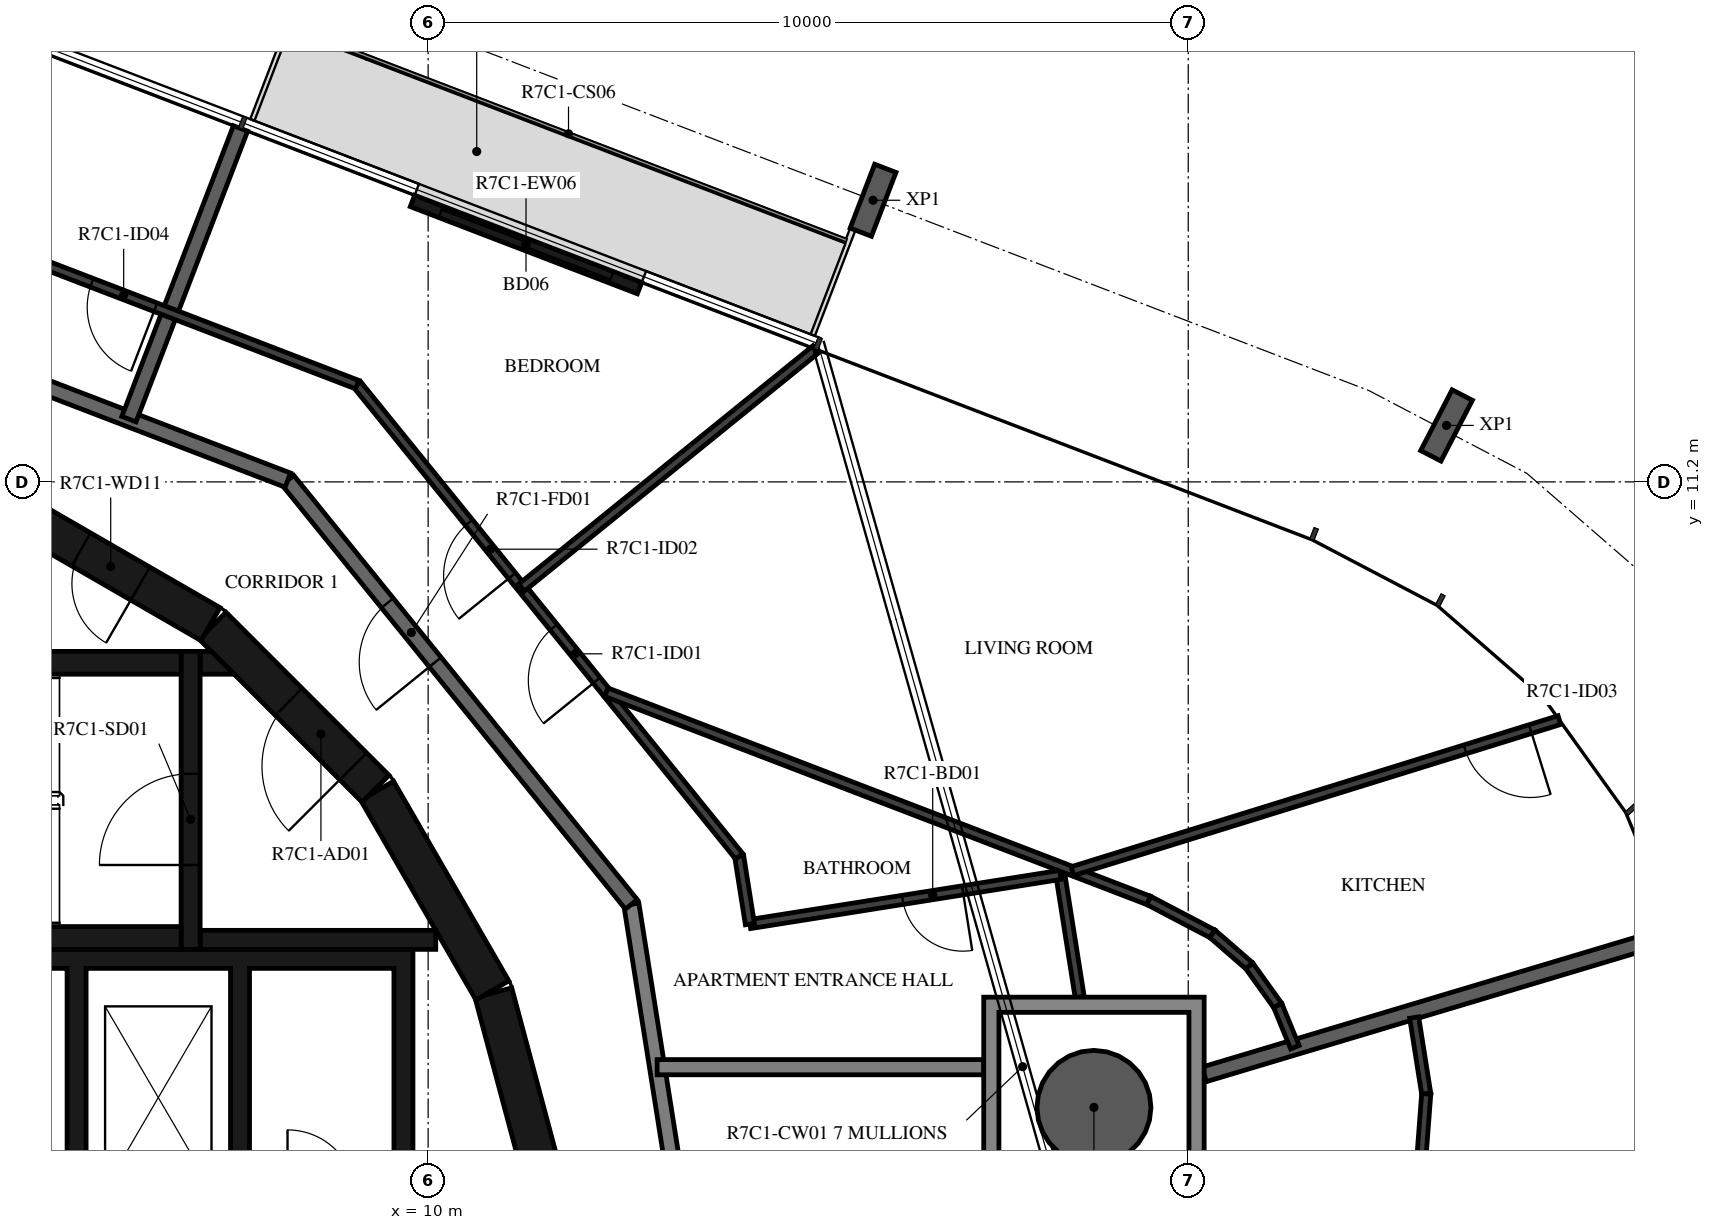
"""IFC4 building model, lengths in metres.
Left out: names, types, materials, properties, quantities, classifications, styles, units other than length and angle.
Written with IfcOpenShell. Run it as: python <this file> out.ifc"""

import sys

from ifc_helpers import new_model, si_unit, direction, frame, frame_2d, origin, origin_2d, place, context, subcontext, project, spatial, polyline, rectangle, hollow_circle, i_section, outline, extrude, element, fill, save


model = new_model("IFC4")
c1 = context("Model", 3, precision=1e-05, world=origin(), true_north=direction((0.0, 1.0)))
c2 = subcontext(c1, "Body", "Model", "MODEL_VIEW")
j1 = project(units=[si_unit("LENGTHUNIT", "METRE"), si_unit("PLANEANGLEUNIT", "RADIAN")], contexts=[c1])
p1 = place(None, origin())
s1 = spatial("IfcSite", under=j1, at=p1, CompositionType="ELEMENT")
p2 = place(p1, origin())
s2 = spatial("IfcBuilding", under=s1, at=p2, CompositionType="ELEMENT")
p3 = place(p2, frame((0.0, 0.0, 287.9)))
s3 = spatial("IfcBuildingStorey", under=s2, at=p3, CompositionType="ELEMENT", Elevation=287.9)
p4 = place(p3, frame((18.76, 2.971, -0.38), z_axis=(0.0, 0.0, 1.0), x_axis=(1.0, 0.0, 0.0)))
e1 = element("IfcColumn", 1, at=p4, inside=s3, PredefinedType="COLUMN", context=c2, shape_type="SweptSolid", body=[
    extrude(hollow_circle(Radius=0.75, WallThickness=0.035, at=origin_2d()), origin(), (0.0, 0.0, 1.0), 2.616),
])
for number, where, z_axis, x_axis in (
    (2, (23.398, 11.943, -0.38), (0.0, 0.0, 1.0), (0.888, -0.459, 0.0)),
    (3, (15.854, 14.905, -0.38), (0.0, 0.0, 1.0), (0.934, -0.358, 0.0)),
):
    element("IfcColumn", number, at=place(p3, frame(where, z_axis=z_axis, x_axis=x_axis)), inside=s3, PredefinedType="COLUMN", context=c2, shape_type="SweptSolid", body=[
        extrude(i_section(OverallWidth=0.3, OverallDepth=0.9, WebThickness=0.019, FlangeThickness=0.035, FilletRadius=0.03, at=origin_2d()), origin(), (0.0, 0.0, 1.0), 2.616),
    ])
p5 = place(p3, frame((12.781, 13.75, 0.0), z_axis=(0.0, 0.0, 1.0), x_axis=(-0.933579413923, 0.358370587381, 0.0)))
e4 = element("IfcWall", 4, at=p5, inside=s3, PredefinedType="STANDARD", context=c2, shape_type="SweptSolid", body=[
    extrude(rectangle(XDim=3.2, YDim=0.16, at=frame_2d((1.6, 0.0))), origin(), (0.0, 0.0, 1.0), 3.05),
])
p6 = place(p5, frame((0.4, 0.0, 0.0)))
e5 = element("IfcOpeningElement", 5, at=p6, cuts=e4, PredefinedType="OPENING", context=c2, shape_type="SweptSolid", body=[
    extrude(rectangle(XDim=2.4, YDim=2.4, at=frame_2d((1.2, 1.2))), frame((0.0, 0.09, 0.0), z_axis=(0.0, -1.0, 0.0), x_axis=(1.0, 0.0, 0.0)), (0.0, 0.0, 1.0), 0.18),
])
for number, where, z_axis, x_axis in (
    (6, (11.643, 1.55, 0.0), (0.0, 0.0, 1.0), (-0.259, 0.966, 0.0)),
    (7, (10.845, 4.51, 0.0), (0.0, 0.0, 1.0), (-0.5, 0.866, 0.0)),
):
    element("IfcWall", number, at=place(p3, frame(where, z_axis=z_axis, x_axis=x_axis)), inside=s3, PredefinedType="SHEAR", context=c2, shape_type="SweptSolid", body=[
        extrude(rectangle(XDim=3.033, YDim=0.5, at=frame_2d((1.516, 0.0))), origin(), (0.0, 0.0, 1.0), 3.05),
    ])
p7 = place(p3, frame((9.308, 7.164, 0.0), z_axis=(0.0, 0.0, 1.0), x_axis=(-0.707106781187, 0.707106781187, 0.0)))
e8 = element("IfcWall", 8, at=p7, inside=s3, PredefinedType="SHEAR", context=c2, shape_type="SweptSolid", body=[
    extrude(rectangle(XDim=3.032, YDim=0.5, at=frame_2d((1.516, 0.0))), origin(), (0.0, 0.0, 1.0), 3.05),
])
p8 = place(p7, frame((0.416, 0.0, 0.0)))
e9 = element("IfcOpeningElement", 9, at=p8, cuts=e8, PredefinedType="OPENING", context=c2, shape_type="SweptSolid", body=[
    extrude(rectangle(XDim=1.2, YDim=2.1, at=frame_2d((0.6, 1.05))), frame((0.0, 0.26, 0.0), z_axis=(0.0, -1.0, 0.0), x_axis=(1.0, 0.0, 0.0)), (0.0, 0.0, 1.0), 0.52),
])
p9 = place(p3, frame((7.137, 9.329, 0.0), z_axis=(0.0, 0.0, 1.0), x_axis=(-0.865975092491, 0.500087131594, 0.0)))
e10 = element("IfcWall", 10, at=p9, inside=s3, PredefinedType="SHEAR", context=c2, shape_type="SweptSolid", body=[
    extrude(rectangle(XDim=3.033, YDim=0.5, at=frame_2d((1.516, 0.0))), origin(), (0.0, 0.0, 1.0), 3.05),
])
p10 = place(p9, frame((1.066, 0.0, 0.0)))
e11 = element("IfcOpeningElement", 11, at=p10, cuts=e10, PredefinedType="OPENING", context=c2, shape_type="SweptSolid", body=[
    extrude(rectangle(XDim=0.9, YDim=2.1, at=frame_2d((0.45, 1.05))), frame((0.0, 0.26, 0.0), z_axis=(0.0, -1.0, 0.0), x_axis=(1.0, 0.0, 0.0)), (0.0, 0.0, 1.0), 0.52),
])
for number, where, z_axis, x_axis in (
    (12, (0.0, 5.2, 0.0), (0.0, 0.0, 1.0), (1.0, 0.0, 0.0)),
    (13, (0.0, 8.82, 0.0), (0.0, 0.0, 1.0), (1.0, 0.0, 0.0)),
):
    element("IfcWall", number, at=place(p3, frame(where, z_axis=z_axis, x_axis=x_axis)), inside=s3, PredefinedType="SHEAR", context=c2, shape_type="SweptSolid", body=[
        extrude(rectangle(XDim=6.75, YDim=0.3, at=frame_2d((3.375, 0.0))), origin(), (0.0, 0.0, 1.0), 3.05),
    ])
p11 = place(p3, frame((6.875, 5.05, 0.0), z_axis=(0.0, 0.0, 1.0), x_axis=(0.0, 1.0, 0.0)))
e14 = element("IfcWall", 14, at=p11, inside=s3, PredefinedType="SHEAR", context=c2, shape_type="SweptSolid", body=[
    extrude(rectangle(XDim=3.92, YDim=0.25, at=frame_2d((1.96, 0.0))), origin(), (0.0, 0.0, 1.0), 3.05),
])
p12 = place(p11, frame((1.11, 0.0, 0.0)))
e15 = element("IfcOpeningElement", 15, at=p12, cuts=e14, PredefinedType="OPENING", context=c2, shape_type="SweptSolid", body=[
    extrude(rectangle(XDim=1.2, YDim=2.1, at=frame_2d((0.6, 1.05))), frame((0.0, 0.135, 0.0), z_axis=(0.0, -1.0, 0.0), x_axis=(1.0, 0.0, 0.0)), (0.0, 0.0, 1.0), 0.27),
])
p13 = place(p3, frame((7.0, 5.175, 0.0), z_axis=(0.0, 0.0, 1.0), x_axis=(1.0, 0.0, 0.0)))
e16 = element("IfcWall", 16, at=p13, inside=s3, PredefinedType="SHEAR", context=c2, shape_type="SweptSolid", body=[
    extrude(rectangle(XDim=3.1, YDim=0.25, at=frame_2d((1.55, 0.0))), origin(), (0.0, 0.0, 1.0), 3.05),
])
p14 = place(p3, origin())
e17 = element("IfcWall", 17, at=p14, inside=s3, PredefinedType="SHEAR", context=c2, shape_type="SweptSolid", body=[
    extrude(outline(polyline([(7.448, 8.67), (7.0, 8.67), (7.0, 8.97), (7.148, 8.97), (7.448, 8.67)])), origin(), (0.0, 0.0, 1.0), 3.05),
])
p15 = place(p3, origin())
e18 = element("IfcWall", 18, at=p15, inside=s3, PredefinedType="SHEAR", context=c2, shape_type="SweptSolid", body=[
    extrude(outline(polyline([(-9.8, 1.9), (-9.55, 1.9), (-9.55, 4.8), (-5.5, 4.8), (-5.5, 1.9), (-5.25, 1.9), (-5.25, 4.8), (3.1, 4.8), (3.1, 1.9), (3.35, 1.9), (3.35, 4.8), (5.25, 4.8), (5.25, 1.9), (5.5, 1.9), (5.5, 4.8), (7.4, 4.8), (7.4, 1.9), (7.65, 1.9), (7.65, 4.8), (9.55, 4.8), (9.55, 1.9), (9.8, 1.9), (9.8, 4.8), (9.8, 5.05), (-9.8, 5.05), (-9.8, 4.8), (-9.8, 1.9)])), origin(), (0.0, 0.0, 1.0), 3.05),
])
p16 = place(p3, frame((13.797, -1.45, 0.0), z_axis=(0.0, 0.0, 1.0), x_axis=(-0.156421704315, 0.987690361611, 0.0)))
e19 = element("IfcWall", 19, at=p16, inside=s3, PredefinedType="STANDARD", context=c2, shape_type="SweptSolid", body=[
    extrude(rectangle(XDim=7.181, YDim=0.2, at=frame_2d((3.591, 0.0))), origin(), (0.0, 0.0, 1.0), 3.05),
])
p17 = place(p3, frame((12.673, 5.643, 0.0), z_axis=(0.0, 0.0, 1.0), x_axis=(-0.629302871585, 0.777160148113, 0.0)))
e20 = element("IfcWall", 20, at=p17, inside=s3, PredefinedType="STANDARD", context=c2, shape_type="SweptSolid", body=[
    extrude(rectangle(XDim=7.181, YDim=0.2, at=frame_2d((3.59, 0.0))), origin(), (0.0, 0.0, 1.0), 3.05),
])
p18 = place(p17, frame((4.1, 0.0, 0.0)))
e21 = element("IfcOpeningElement", 21, at=p18, cuts=e20, PredefinedType="OPENING", context=c2, shape_type="SweptSolid", body=[
    extrude(rectangle(XDim=1.0, YDim=2.1, at=frame_2d((0.5, 1.05))), frame((0.0, 0.11, 0.0), z_axis=(0.0, -1.0, 0.0), x_axis=(1.0, 0.0, 0.0)), (0.0, 0.0, 1.0), 0.22),
])
p19 = place(p3, frame((8.154, 11.223, 0.0), z_axis=(0.0, 0.0, 1.0), x_axis=(-0.93359073609, 0.358341090983, 0.0)))
e22 = element("IfcWall", 22, at=p19, inside=s3, PredefinedType="STANDARD", context=c2, shape_type="SweptSolid", body=[
    extrude(rectangle(XDim=7.181, YDim=0.2, at=frame_2d((3.59, 0.0))), origin(), (0.0, 0.0, 1.0), 3.05),
])
p20 = place(p3, frame((17.309, 3.5, 0.0), z_axis=(0.0, 0.0, 1.0), x_axis=(-1.0, 0.0, 0.0)))
e23 = element("IfcWall", 23, at=p20, inside=s3, PredefinedType="STANDARD", context=c2, shape_type="SweptSolid", body=[
    extrude(rectangle(XDim=4.297, YDim=0.2, at=frame_2d((2.148, 0.0))), origin(), (0.0, 0.0, 1.0), 3.05),
])
p21 = place(p3, frame((7.532, 15.85, 0.0), z_axis=(0.0, 0.0, 1.0), x_axis=(-0.358355996975, -0.933585014571, 0.0)))
e24 = element("IfcWall", 24, at=p21, inside=s3, PredefinedType="STANDARD", context=c2, shape_type="SweptSolid", body=[
    extrude(rectangle(XDim=4.096, YDim=0.2, at=frame_2d((2.048, 0.0))), origin(), (0.0, 0.0, 1.0), 3.05),
])
p22 = place(p3, frame((20.209, 3.405, 0.0), z_axis=(0.0, 0.0, 1.0), x_axis=(0.957991224208, 0.286797514529, 0.0)))
e25 = element("IfcWall", 25, at=p22, inside=s3, PredefinedType="STANDARD", context=c2, shape_type="SweptSolid", body=[
    extrude(rectangle(XDim=6.471, YDim=0.2, at=frame_2d((3.236, 0.0))), origin(), (0.0, 0.0, 1.0), 3.05),
])
p23 = place(p3, frame((18.572, 4.421, 0.0), z_axis=(0.0, 0.0, 1.0), x_axis=(-0.156347444306, 0.987702119396, 0.0)))
e26 = element("IfcWall", 26, at=p23, inside=s3, PredefinedType="PARTITIONING", context=c2, shape_type="SweptSolid", body=[
    extrude(rectangle(XDim=1.629, YDim=0.12, at=frame_2d((0.814, 0.0))), origin(), (0.0, 0.0, 1.0), 3.05),
])
p24 = place(p3, frame((18.317, 6.03, 0.0), z_axis=(0.0, 0.0, 1.0), x_axis=(-0.9876848128, -0.156456737039, 0.0)))
e27 = element("IfcWall", 27, at=p24, inside=s3, PredefinedType="PARTITIONING", context=c2, shape_type="SweptSolid", body=[
    extrude(rectangle(XDim=4.135, YDim=0.12, at=frame_2d((2.068, 0.0))), origin(), (0.0, 0.0, 1.0), 3.05),
])
p25 = place(p24, frame((1.3, 0.0, 0.0)))
e28 = element("IfcOpeningElement", 28, at=p25, cuts=e27, PredefinedType="OPENING", context=c2, shape_type="SweptSolid", body=[
    extrude(rectangle(XDim=0.8, YDim=2.1, at=frame_2d((0.4, 1.05))), frame((0.0, 0.07, 0.0), z_axis=(0.0, -1.0, 0.0), x_axis=(1.0, 0.0, 0.0)), (0.0, 0.0, 1.0), 0.14),
])
p26 = place(p3, frame((14.233, 5.383, 0.0), z_axis=(0.0, 0.0, 1.0), x_axis=(-0.156365428504, 0.987699272435, 0.0)))
e29 = element("IfcWall", 29, at=p26, inside=s3, PredefinedType="PARTITIONING", context=c2, shape_type="SweptSolid", body=[
    extrude(rectangle(XDim=0.902, YDim=0.12, at=frame_2d((0.451, 0.0))), origin(), (0.0, 0.0, 1.0), 3.05),
])
p27 = place(p3, frame((14.092, 6.274, 0.0), z_axis=(0.0, 0.0, 1.0), x_axis=(-0.62933367237, 0.777135206268, 0.0)))
e30 = element("IfcWall", 30, at=p27, inside=s3, PredefinedType="PARTITIONING", context=c2, shape_type="SweptSolid", body=[
    extrude(rectangle(XDim=7.985, YDim=0.12, at=frame_2d((3.992, 0.0))), origin(), (0.0, 0.0, 1.0), 3.05),
])
p28 = place(p27, frame((2.978, 0.0, 0.0)))
e31 = element("IfcOpeningElement", 31, at=p28, cuts=e30, PredefinedType="OPENING", context=c2, shape_type="SweptSolid", body=[
    extrude(rectangle(XDim=0.9, YDim=2.1, at=frame_2d((0.45, 1.05))), frame((0.0, 0.07, 0.0), z_axis=(0.0, -1.0, 0.0), x_axis=(1.0, 0.0, 0.0)), (0.0, 0.0, 1.0), 0.14),
])
p29 = place(p27, frame((4.749, 0.0, 0.0)))
e32 = element("IfcOpeningElement", 32, at=p29, cuts=e30, PredefinedType="OPENING", context=c2, shape_type="SweptSolid", body=[
    extrude(rectangle(XDim=0.9, YDim=2.1, at=frame_2d((0.45, 1.05))), frame((0.0, 0.07, 0.0), z_axis=(0.0, -1.0, 0.0), x_axis=(1.0, 0.0, 0.0)), (0.0, 0.0, 1.0), 0.14),
])
p30 = place(p3, frame((9.067, 12.479, 0.0), z_axis=(0.0, 0.0, 1.0), x_axis=(-0.933579449035, 0.358370495911, 0.0)))
e33 = element("IfcWall", 33, at=p30, inside=s3, PredefinedType="PARTITIONING", context=c2, shape_type="SweptSolid", body=[
    extrude(rectangle(XDim=7.985, YDim=0.12, at=frame_2d((3.992, 0.0))), origin(), (0.0, 0.0, 1.0), 3.05),
])
p31 = place(p30, frame((2.841, 0.0, 0.0)))
e34 = element("IfcOpeningElement", 34, at=p31, cuts=e33, PredefinedType="OPENING", context=c2, shape_type="SweptSolid", body=[
    extrude(rectangle(XDim=0.9, YDim=2.1, at=frame_2d((0.45, 1.05))), frame((0.0, 0.07, 0.0), z_axis=(0.0, -1.0, 0.0), x_axis=(1.0, 0.0, 0.0)), (0.0, 0.0, 1.0), 0.14),
])
p32 = place(p3, frame((12.344, 8.433, 0.0), z_axis=(0.0, 0.0, 1.0), x_axis=(0.933573435176, -0.358386162029, 0.0)))
e35 = element("IfcWall", 35, at=p32, inside=s3, PredefinedType="PARTITIONING", context=c2, shape_type="SweptSolid", body=[
    extrude(rectangle(XDim=7.644, YDim=0.12, at=frame_2d((3.822, 0.0))), origin(), (0.0, 0.0, 1.0), 3.05),
])
p33 = place(p3, frame((19.48, 5.694, 0.0), z_axis=(0.0, 0.0, 1.0), x_axis=(0.885755816688, -0.464151519662, 0.0)))
e36 = element("IfcWall", 36, at=p33, inside=s3, PredefinedType="PARTITIONING", context=c2, shape_type="SweptSolid", body=[
    extrude(rectangle(XDim=0.947, YDim=0.12, at=frame_2d((0.473, 0.0))), origin(), (0.0, 0.0, 1.0), 3.05),
])
p34 = place(p3, frame((20.319, 5.254, 0.0), z_axis=(0.0, 0.0, 1.0), x_axis=(0.754646464307, -0.656131628493, 0.0)))
e37 = element("IfcWall", 37, at=p34, inside=s3, PredefinedType="PARTITIONING", context=c2, shape_type="SweptSolid", body=[
    extrude(rectangle(XDim=0.642, YDim=0.12, at=frame_2d((0.321, 0.0))), origin(), (0.0, 0.0, 1.0), 3.05),
])
p35 = place(p3, frame((20.803, 4.833, 0.0), z_axis=(0.0, 0.0, 1.0), x_axis=(0.583322588112, -0.812240579014, 0.0)))
e38 = element("IfcWall", 38, at=p35, inside=s3, PredefinedType="PARTITIONING", context=c2, shape_type="SweptSolid", body=[
    extrude(rectangle(XDim=0.642, YDim=0.12, at=frame_2d((0.321, 0.0))), origin(), (0.0, 0.0, 1.0), 3.05),
])
p36 = place(p3, frame((21.177, 4.312, 0.0), z_axis=(0.0, 0.0, 1.0), x_axis=(0.379673715705, -0.925120462212, 0.0)))
e39 = element("IfcWall", 39, at=p36, inside=s3, PredefinedType="PARTITIONING", context=c2, shape_type="SweptSolid", body=[
    extrude(rectangle(XDim=0.594, YDim=0.12, at=frame_2d((0.297, 0.0))), origin(), (0.0, 0.0, 1.0), 3.05),
])
p37 = place(p3, frame((24.883, 8.066, 0.0), z_axis=(0.0, 0.0, 1.0), x_axis=(-0.955106049863, -0.296264127958, 0.0)))
e40 = element("IfcWall", 40, at=p37, inside=s3, PredefinedType="PARTITIONING", context=c2, shape_type="SweptSolid", body=[
    extrude(rectangle(XDim=6.708, YDim=0.12, at=frame_2d((3.354, 0.0))), origin(), (0.0, 0.0, 1.0), 3.05),
])
p38 = place(p37, frame((0.4, 0.0, 0.0)))
e41 = element("IfcOpeningElement", 41, at=p38, cuts=e40, PredefinedType="OPENING", context=c2, shape_type="SweptSolid", body=[
    extrude(rectangle(XDim=0.9, YDim=2.1, at=frame_2d((0.45, 1.05))), frame((0.0, 0.07, 0.0), z_axis=(0.0, -1.0, 0.0), x_axis=(1.0, 0.0, 0.0)), (0.0, 0.0, 1.0), 0.14),
])
p39 = place(p3, frame((15.101, 12.945, 0.0), z_axis=(0.0, 0.0, 1.0), x_axis=(-0.777178675378, -0.629279990575, 0.0)))
e42 = element("IfcWall", 42, at=p39, inside=s3, PredefinedType="PARTITIONING", context=c2, shape_type="SweptSolid", body=[
    extrude(rectangle(XDim=4.982, YDim=0.12, at=frame_2d((2.491, 0.0))), origin(), (0.0, 0.0, 1.0), 3.05),
])
p40 = place(p3, frame((22.972, 4.153, 0.0), z_axis=(0.0, 0.0, 1.0), x_axis=(0.156209385929, -0.987723963336, 0.0)))
e43 = element("IfcWall", 43, at=p40, inside=s3, PredefinedType="PARTITIONING", context=c2, shape_type="SweptSolid", body=[
    extrude(rectangle(XDim=1.016, YDim=0.12, at=frame_2d((0.508, 0.0))), origin(), (0.0, 0.0, 1.0), 3.05),
])
p41 = place(p3, frame((23.131, 3.149, 0.0), z_axis=(0.0, 0.0, 1.0), x_axis=(-0.075446997935, -0.99714981347, 0.0)))
e44 = element("IfcWall", 44, at=p41, inside=s3, PredefinedType="PARTITIONING", context=c2, shape_type="SweptSolid", body=[
    extrude(rectangle(XDim=1.016, YDim=0.12, at=frame_2d((0.508, 0.0))), origin(), (0.0, 0.0, 1.0), 3.05),
])
p42 = place(p3, origin())
e45 = element("IfcWall", 45, at=p42, inside=s3, PredefinedType="STANDARD", context=c2, shape_type="SweptSolid", body=[
    extrude(outline(polyline([(20.209, 4.421), (20.209, 1.521), (17.309, 1.521), (17.309, 4.421), (20.209, 4.421)]), holes=[polyline([(17.51, 1.721), (20.01, 1.721), (20.01, 4.221), (17.51, 4.221), (17.51, 1.721)])]), origin(), (0.0, 0.0, 1.0), 3.05),
])
p43 = place(p6, origin())
e46 = element("IfcDoor", 46, at=p43, inside=s3, OperationType="DOUBLE_DOOR_SLIDING", PredefinedType="DOOR", context=c2, shape_type="SweptSolid", body=[
    extrude(rectangle(XDim=2.4, YDim=2.4, at=frame_2d((1.2, 1.2))), frame((0.0, 0.025, 0.0), z_axis=(0.0, -1.0, 0.0), x_axis=(1.0, 0.0, 0.0)), (0.0, 0.0, 1.0), 0.05),
])
fill(e5, e46)
p44 = place(p12, origin())
e47 = element("IfcDoor", 47, at=p44, inside=s3, OperationType="SINGLE_SWING_LEFT", PredefinedType="DOOR", context=c2, shape_type="SweptSolid", body=[
    extrude(rectangle(XDim=1.2, YDim=2.1, at=frame_2d((0.6, 1.05))), frame((0.0, 0.025, 0.0), z_axis=(0.0, -1.0, 0.0), x_axis=(1.0, 0.0, 0.0)), (0.0, 0.0, 1.0), 0.05),
])
fill(e15, e47)
p45 = place(p8, origin())
e48 = element("IfcDoor", 48, at=p45, inside=s3, OperationType="SINGLE_SWING_RIGHT", PredefinedType="DOOR", context=c2, shape_type="SweptSolid", body=[
    extrude(rectangle(XDim=1.2, YDim=2.1, at=frame_2d((0.6, 1.05))), frame((0.0, 0.025, 0.0), z_axis=(0.0, -1.0, 0.0), x_axis=(1.0, 0.0, 0.0)), (0.0, 0.0, 1.0), 0.05),
])
fill(e9, e48)
p46 = place(p10, origin())
e49 = element("IfcDoor", 49, at=p46, inside=s3, OperationType="SINGLE_SWING_LEFT", PredefinedType="DOOR", context=c2, shape_type="SweptSolid", body=[
    extrude(rectangle(XDim=0.9, YDim=2.1, at=frame_2d((0.45, 1.05))), frame((0.0, 0.025, 0.0), z_axis=(0.0, -1.0, 0.0), x_axis=(1.0, 0.0, 0.0)), (0.0, 0.0, 1.0), 0.05),
])
fill(e11, e49)
p47 = place(p18, origin())
e50 = element("IfcDoor", 50, at=p47, inside=s3, OperationType="SINGLE_SWING_LEFT", PredefinedType="DOOR", context=c2, shape_type="SweptSolid", body=[
    extrude(rectangle(XDim=1.0, YDim=2.1, at=frame_2d((0.5, 1.05))), frame((0.0, 0.025, 0.0), z_axis=(0.0, -1.0, 0.0), x_axis=(1.0, 0.0, 0.0)), (0.0, 0.0, 1.0), 0.05),
])
fill(e21, e50)
p48 = place(p25, origin())
e51 = element("IfcDoor", 51, at=p48, inside=s3, OperationType="SINGLE_SWING_LEFT", PredefinedType="DOOR", context=c2, shape_type="SweptSolid", body=[
    extrude(rectangle(XDim=0.8, YDim=2.1, at=frame_2d((0.4, 1.05))), frame((0.0, 0.025, 0.0), z_axis=(0.0, -1.0, 0.0), x_axis=(1.0, 0.0, 0.0)), (0.0, 0.0, 1.0), 0.05),
])
fill(e28, e51)
p49 = place(p28, origin())
e52 = element("IfcDoor", 52, at=p49, inside=s3, OperationType="SINGLE_SWING_LEFT", PredefinedType="DOOR", context=c2, shape_type="SweptSolid", body=[
    extrude(rectangle(XDim=0.9, YDim=2.1, at=frame_2d((0.45, 1.05))), frame((0.0, 0.025, 0.0), z_axis=(0.0, -1.0, 0.0), x_axis=(1.0, 0.0, 0.0)), (0.0, 0.0, 1.0), 0.05),
])
fill(e31, e52)
p50 = place(p29, origin())
e53 = element("IfcDoor", 53, at=p50, inside=s3, OperationType="SINGLE_SWING_LEFT", PredefinedType="DOOR", context=c2, shape_type="SweptSolid", body=[
    extrude(rectangle(XDim=0.9, YDim=2.1, at=frame_2d((0.45, 1.05))), frame((0.0, 0.025, 0.0), z_axis=(0.0, -1.0, 0.0), x_axis=(1.0, 0.0, 0.0)), (0.0, 0.0, 1.0), 0.05),
])
fill(e32, e53)
p51 = place(p38, origin())
e54 = element("IfcDoor", 54, at=p51, inside=s3, OperationType="SINGLE_SWING_LEFT", PredefinedType="DOOR", context=c2, shape_type="SweptSolid", body=[
    extrude(rectangle(XDim=0.9, YDim=2.1, at=frame_2d((0.45, 1.05))), frame((0.0, 0.025, 0.0), z_axis=(0.0, -1.0, 0.0), x_axis=(1.0, 0.0, 0.0)), (0.0, 0.0, 1.0), 0.05),
])
fill(e41, e54)
p52 = place(p31, origin())
e55 = element("IfcDoor", 55, at=p52, inside=s3, OperationType="SINGLE_SWING_LEFT", PredefinedType="DOOR", context=c2, shape_type="SweptSolid", body=[
    extrude(rectangle(XDim=0.9, YDim=2.1, at=frame_2d((0.45, 1.05))), frame((0.0, 0.025, 0.0), z_axis=(0.0, -1.0, 0.0), x_axis=(1.0, 0.0, 0.0)), (0.0, 0.0, 1.0), 0.05),
])
fill(e34, e55)
save(model, sys.argv[1])
